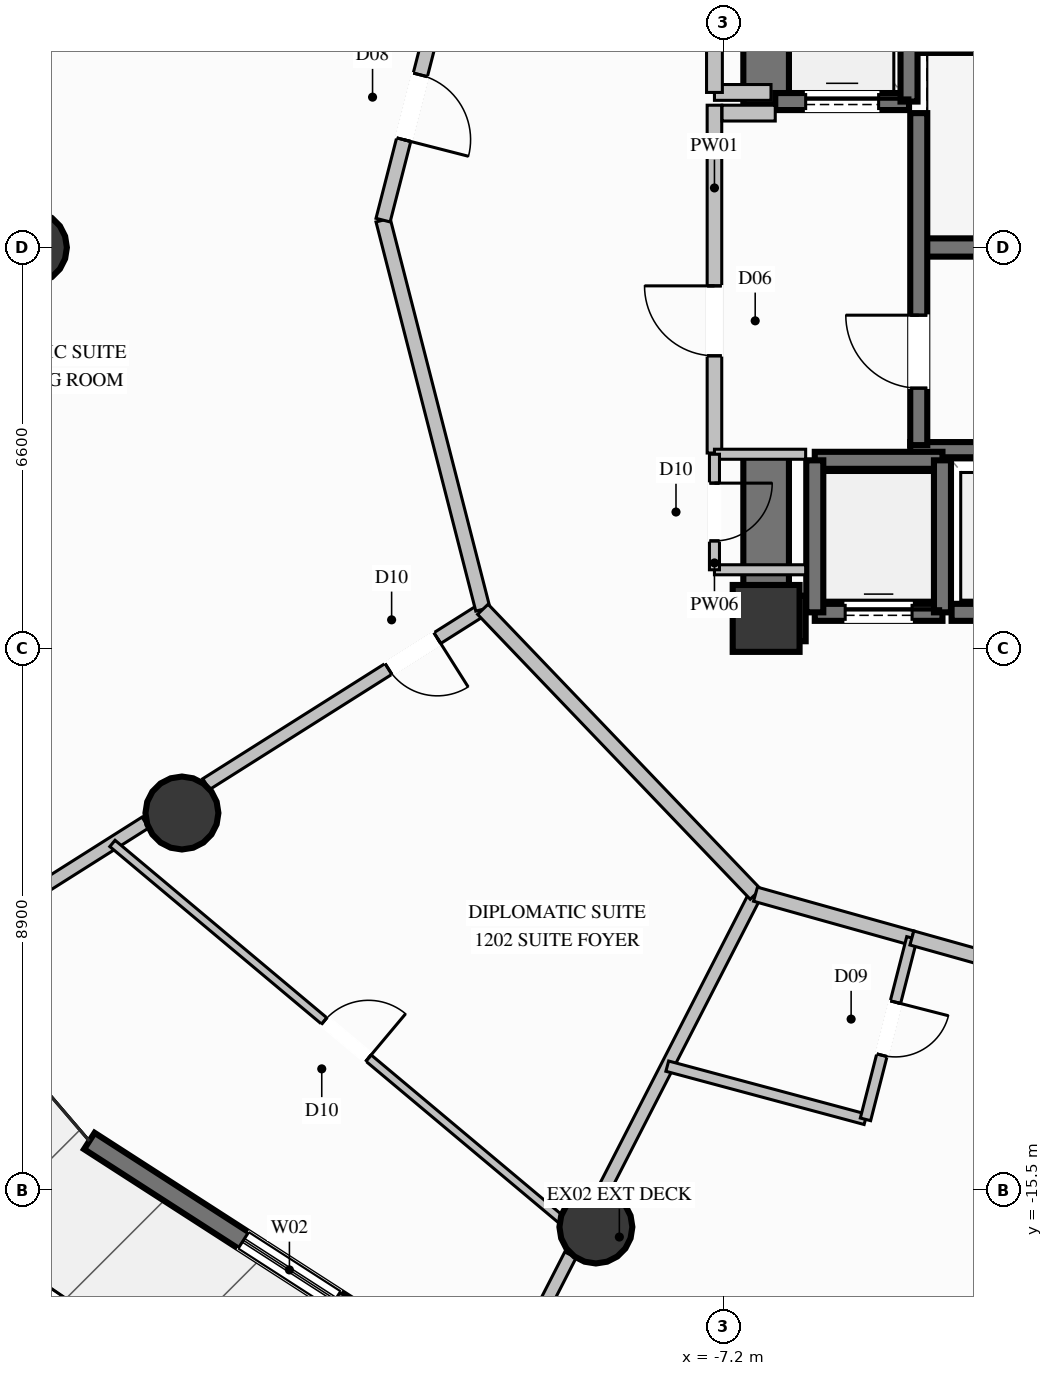
"""IFC4 building model, lengths in metres.
Left out: names, types, materials, properties, quantities, classifications, styles, units other than length and angle.
Written with IfcOpenShell. Run it as: python <this file> out.ifc"""

import sys

from ifc_helpers import new_model, si_unit, direction, frame, frame_2d, origin, origin_2d, place, context, subcontext, project, spatial, rectangle, circle, extrude, element, fill, save


model = new_model("IFC4")
c1 = context("Model", 3, precision=1e-05, world=origin(), true_north=direction((0.0, 1.0)))
c2 = subcontext(c1, "Body", "Model", "MODEL_VIEW")
j1 = project(units=[si_unit("LENGTHUNIT", "METRE"), si_unit("PLANEANGLEUNIT", "RADIAN")], contexts=[c1])
p1 = place(None, origin())
s1 = spatial("IfcSite", under=j1, at=p1, CompositionType="ELEMENT")
p2 = place(p1, origin())
s2 = spatial("IfcBuilding", under=s1, at=p2, CompositionType="ELEMENT")
p3 = place(p2, frame((0.0, 0.0, 46.4)))
s3 = spatial("IfcBuildingStorey", under=s2, at=p3, CompositionType="ELEMENT", Elevation=46.4)
p4 = place(p3, frame((-6.5, -6.1, 0.0), z_axis=(0.0, 0.0, 1.0), x_axis=(1.0, 0.0, 0.0)))
e1 = element("IfcColumn", 1, at=p4, inside=s3, PredefinedType="COLUMN", context=c2, shape_type="SweptSolid", body=[
    extrude(rectangle(XDim=1.1, YDim=1.1, at=origin_2d()), origin(), (0.0, 0.0, 1.0), 3.6),
])
p5 = place(p3, frame((-3.99, 0.0, 0.0), z_axis=(0.0, 0.0, 1.0), x_axis=(1.0, 0.0, 0.0)))
e2 = element("IfcWall", 2, at=p5, inside=s3, PredefinedType="SHEAR", context=c2, shape_type="SweptSolid", body=[
    extrude(rectangle(XDim=7.98, YDim=0.3, at=frame_2d((3.99, 0.0))), origin(), (0.0, 0.0, 1.0), 3.6),
])
for number, where, z_axis, x_axis in (
    (3, (-4.13, -3.325, 0.0), (0.0, 0.0, 1.0), (1.0, 0.0, 0.0)),
    (4, (-4.13, 3.325, 0.0), (0.0, 0.0, 1.0), (1.0, 0.0, 0.0)),
):
    element("IfcWall", number, at=place(p3, frame(where, z_axis=z_axis, x_axis=x_axis)), inside=s3, PredefinedType="SOLIDWALL", context=c2, shape_type="SweptSolid", body=[
        extrude(rectangle(XDim=8.26, YDim=0.25, at=frame_2d((4.13, 0.0))), origin(), (0.0, 0.0, 1.0), 3.6),
    ])
p6 = place(p3, frame((-6.125, -6.1, 0.0), z_axis=(0.0, 0.0, 1.0), x_axis=(1.0, 0.0, 0.0)))
e5 = element("IfcWall", 5, at=p6, inside=s3, PredefinedType="SHEAR", context=c2, shape_type="SweptSolid", body=[
    extrude(rectangle(XDim=0.275, YDim=0.75, at=frame_2d((0.137, 0.0))), origin(), (0.0, 0.0, 1.0), 3.6),
])
p7 = place(p3, frame((-6.5, 2.35, 0.0), z_axis=(0.0, 0.0, 1.0), x_axis=(0.0, 1.0, 0.0)))
e6 = element("IfcWall", 6, at=p7, inside=s3, PredefinedType="SHEAR", context=c2, shape_type="SweptSolid", body=[
    extrude(rectangle(XDim=4.125, YDim=0.75, at=frame_2d((2.062, 0.0))), origin(), (0.0, 0.0, 1.0), 3.6),
])
p8 = place(p3, frame((-6.5, -6.475, 0.0), z_axis=(0.0, 0.0, 1.0), x_axis=(0.0, 1.0, 0.0)))
e7 = element("IfcWall", 7, at=p8, inside=s3, PredefinedType="SHEAR", context=c2, shape_type="SweptSolid", body=[
    extrude(rectangle(XDim=3.125, YDim=0.75, at=frame_2d((1.562, 0.0))), origin(), (0.0, 0.0, 1.0), 3.6),
])
for number, where, z_axis, x_axis in (
    (8, (-18.6, 0.0, 0.0), (0.0, 0.0, 1.0), (1.0, 0.0, 0.0)),
    (9, (-16.108, -9.3, 0.0), (0.0, 0.0, 1.0), (1.0, 0.0, 0.0)),
    (10, (-9.3, -16.108, 0.0), (0.0, 0.0, 1.0), (1.0, 0.0, 0.0)),
):
    element("IfcColumn", number, at=place(p3, frame(where, z_axis=z_axis, x_axis=x_axis)), inside=s3, PredefinedType="COLUMN", context=c2, shape_type="SweptSolid", body=[
        extrude(circle(Radius=0.6, at=origin_2d()), origin(), (0.0, 0.0, 1.0), 3.6),
    ])
p9 = place(p3, frame((-10.78, -19.107, 0.0), z_axis=(0.0, 0.0, 1.0), x_axis=(-0.840699239941, 0.541502343451, 0.0)))
e11 = element("IfcWall", 11, at=p9, inside=s3, PredefinedType="SOLIDWALL", context=c2, shape_type="SweptSolid", body=[
    extrude(rectangle(XDim=8.149, YDim=0.32, at=frame_2d((4.075, 0.0))), origin(), (0.0, 0.0, 1.0), 3.34),
])
p10 = place(p9, frame((3.335, 0.0, 0.35)))
e12 = element("IfcOpeningElement", 12, at=p10, cuts=e11, PredefinedType="OPENING", context=c2, shape_type="SweptSolid", body=[
    extrude(rectangle(XDim=1.8, YDim=2.6, at=frame_2d((0.9, 1.3))), frame((0.0, 0.17, 0.0), z_axis=(0.0, -1.0, 0.0), x_axis=(1.0, 0.0, 0.0)), (0.0, 0.0, 1.0), 0.34),
])
p11 = place(p3, frame((-5.7, -6.0, 0.0), z_axis=(0.0, 0.0, 1.0), x_axis=(1.0, 0.0, 0.0)))
e13 = element("IfcWall", 13, at=p11, inside=s3, PredefinedType="SOLIDWALL", context=c2, shape_type="SweptSolid", body=[
    extrude(rectangle(XDim=2.1, YDim=0.28, at=frame_2d((1.05, 0.0))), origin(), (0.0, 0.0, 1.0), 3.34),
])
p12 = place(p11, frame((0.5, 0.0, 0.0)))
e14 = element("IfcOpeningElement", 14, at=p12, cuts=e13, PredefinedType="OPENING", context=c2, shape_type="SweptSolid", body=[
    extrude(rectangle(XDim=1.1, YDim=2.2, at=frame_2d((0.55, 1.1))), frame((0.0, 0.15, 0.0), z_axis=(0.0, -1.0, 0.0), x_axis=(1.0, 0.0, 0.0)), (0.0, 0.0, 1.0), 0.3),
])
p13 = place(p3, frame((-3.6, -3.5, 0.0), z_axis=(0.0, 0.0, 1.0), x_axis=(-1.0, 0.0, 0.0)))
e15 = element("IfcWall", 15, at=p13, inside=s3, PredefinedType="SOLIDWALL", context=c2, shape_type="SweptSolid", body=[
    extrude(rectangle(XDim=2.1, YDim=0.28, at=frame_2d((1.05, 0.0))), origin(), (0.0, 0.0, 1.0), 3.34),
])
for number, where, z_axis, x_axis in (
    (16, (-5.7, -3.5, 0.0), (0.0, 0.0, 1.0), (0.0, -1.0, 0.0)),
    (17, (-3.6, -6.0, 0.0), (0.0, 0.0, 1.0), (0.0, 1.0, 0.0)),
):
    element("IfcWall", number, at=place(p3, frame(where, z_axis=z_axis, x_axis=x_axis)), inside=s3, PredefinedType="SOLIDWALL", context=c2, shape_type="SweptSolid", body=[
        extrude(rectangle(XDim=2.5, YDim=0.28, at=frame_2d((1.25, 0.0))), origin(), (0.0, 0.0, 1.0), 3.34),
    ])
p14 = place(p3, frame((-3.45, -6.0, 0.0), z_axis=(0.0, 0.0, 1.0), x_axis=(1.0, 0.0, 0.0)))
e18 = element("IfcWall", 18, at=p14, inside=s3, PredefinedType="SOLIDWALL", context=c2, shape_type="SweptSolid", body=[
    extrude(rectangle(XDim=2.1, YDim=0.28, at=frame_2d((1.05, 0.0))), origin(), (0.0, 0.0, 1.0), 3.34),
])
p15 = place(p14, frame((0.5, 0.0, 0.0)))
e19 = element("IfcOpeningElement", 19, at=p15, cuts=e18, PredefinedType="OPENING", context=c2, shape_type="SweptSolid", body=[
    extrude(rectangle(XDim=1.1, YDim=2.2, at=frame_2d((0.55, 1.1))), frame((0.0, 0.15, 0.0), z_axis=(0.0, -1.0, 0.0), x_axis=(1.0, 0.0, 0.0)), (0.0, 0.0, 1.0), 0.3),
])
p16 = place(p3, frame((-6.35, 2.4, 0.0), z_axis=(0.0, 0.0, 1.0), x_axis=(1.0, 0.0, 0.0)))
e20 = element("IfcWall", 20, at=p16, inside=s3, PredefinedType="SOLIDWALL", context=c2, shape_type="SweptSolid", body=[
    extrude(rectangle(XDim=2.2, YDim=0.28, at=frame_2d((1.1, 0.0))), origin(), (0.0, 0.0, 1.0), 3.34),
])
p17 = place(p16, frame((0.5, 0.0, 0.0)))
e21 = element("IfcOpeningElement", 21, at=p17, cuts=e20, PredefinedType="OPENING", context=c2, shape_type="SweptSolid", body=[
    extrude(rectangle(XDim=1.2, YDim=2.2, at=frame_2d((0.6, 1.1))), frame((0.0, 0.15, 0.0), z_axis=(0.0, -1.0, 0.0), x_axis=(1.0, 0.0, 0.0)), (0.0, 0.0, 1.0), 0.3),
])
p18 = place(p3, frame((-4.15, 2.4, 0.0), z_axis=(0.0, 0.0, 1.0), x_axis=(0.0, 1.0, 0.0)))
e22 = element("IfcWall", 22, at=p18, inside=s3, PredefinedType="SOLIDWALL", context=c2, shape_type="SweptSolid", body=[
    extrude(rectangle(XDim=2.7, YDim=0.28, at=frame_2d((1.35, 0.0))), origin(), (0.0, 0.0, 1.0), 3.34),
])
p19 = place(p3, frame((-3.99, -3.25, 0.0), z_axis=(0.0, 0.0, 1.0), x_axis=(0.0, 1.0, 0.0)))
e23 = element("IfcWall", 23, at=p19, inside=s3, PredefinedType="SOLIDWALL", context=c2, shape_type="SweptSolid", body=[
    extrude(rectangle(XDim=5.46, YDim=0.28, at=frame_2d((2.73, 0.0))), origin(), (0.0, 0.0, 1.0), 3.34),
])
p20 = place(p19, frame((0.937, 0.0, 0.0)))
e24 = element("IfcOpeningElement", 24, at=p20, cuts=e23, PredefinedType="OPENING", context=c2, shape_type="SweptSolid", body=[
    extrude(rectangle(XDim=1.2, YDim=2.2, at=frame_2d((0.6, 1.1))), frame((0.0, 0.15, 0.0), z_axis=(0.0, -1.0, 0.0), x_axis=(1.0, 0.0, 0.0)), (0.0, 0.0, 1.0), 0.3),
])
p21 = place(p3, frame((-7.35, -3.38, 0.0), z_axis=(0.0, 0.0, 1.0), x_axis=(0.0, 1.0, 0.0)))
e25 = element("IfcWall", 25, at=p21, inside=s3, PredefinedType="PARTITIONING", context=c2, shape_type="SweptSolid", body=[
    extrude(rectangle(XDim=5.72, YDim=0.24, at=frame_2d((2.86, 0.0))), origin(), (0.0, 0.0, 1.0), 2.425),
])
p22 = place(p21, frame((1.599, 0.0, 0.0)))
e26 = element("IfcOpeningElement", 26, at=p22, cuts=e25, PredefinedType="OPENING", context=c2, shape_type="SweptSolid", body=[
    extrude(rectangle(XDim=1.15, YDim=2.2, at=frame_2d((0.575, 1.1))), frame((0.0, 0.13, 0.0), z_axis=(0.0, -1.0, 0.0), x_axis=(1.0, 0.0, 0.0)), (0.0, 0.0, 1.0), 0.26),
])
p23 = place(p3, frame((-7.225, 2.21, 0.0), z_axis=(0.0, 0.0, 1.0), x_axis=(1.0, 0.0, 0.0)))
e27 = element("IfcWall", 27, at=p23, inside=s3, PredefinedType="PARTITIONING", context=c2, shape_type="SweptSolid", body=[
    extrude(rectangle(XDim=0.875, YDim=0.26, at=frame_2d((0.438, 0.0))), origin(), (0.0, 0.0, 1.0), 3.34),
])
p24 = place(p3, frame((-7.35, 2.55, 0.0), z_axis=(0.0, 0.0, 1.0), x_axis=(1.0, 0.0, 0.0)))
e28 = element("IfcWall", 28, at=p24, inside=s3, PredefinedType="PARTITIONING", context=c2, shape_type="SweptSolid", body=[
    extrude(rectangle(XDim=0.93, YDim=0.26, at=frame_2d((0.465, 0.0))), origin(), (0.0, 0.0, 1.0), 3.34),
])
p25 = place(p3, frame((-7.35, 2.55, 0.0), z_axis=(0.0, 0.0, 1.0), x_axis=(0.0, 1.0, 0.0)))
e29 = element("IfcWall", 29, at=p25, inside=s3, PredefinedType="PARTITIONING", context=c2, shape_type="SweptSolid", body=[
    extrude(rectangle(XDim=2.4, YDim=0.26, at=frame_2d((1.2, 0.0))), origin(), (0.0, 0.0, 1.0), 2.425),
])
p26 = place(p25, frame((0.775, 0.0, 0.0)))
e30 = element("IfcOpeningElement", 30, at=p26, cuts=e29, PredefinedType="OPENING", context=c2, shape_type="SweptSolid", body=[
    extrude(rectangle(XDim=0.85, YDim=2.05, at=frame_2d((0.425, 1.025))), frame((0.0, 0.14, 0.0), z_axis=(0.0, -1.0, 0.0), x_axis=(1.0, 0.0, 0.0)), (0.0, 0.0, 1.0), 0.28),
])
p27 = place(p3, frame((-7.35, -5.3, 0.0), z_axis=(0.0, 0.0, 1.0), x_axis=(1.0, 0.0, 0.0)))
e31 = element("IfcWall", 31, at=p27, inside=s3, PredefinedType="PARTITIONING", context=c2, shape_type="SweptSolid", body=[
    extrude(rectangle(XDim=1.5, YDim=0.165, at=frame_2d((0.75, 0.0))), origin(), (0.0, 0.0, 1.0), 2.425),
])
p28 = place(p3, frame((-5.85, -3.4, 0.0), z_axis=(0.0, 0.0, 1.0), x_axis=(-1.0, 0.0, 0.0)))
e32 = element("IfcWall", 32, at=p28, inside=s3, PredefinedType="PARTITIONING", context=c2, shape_type="SweptSolid", body=[
    extrude(rectangle(XDim=1.5, YDim=0.165, at=frame_2d((0.75, 0.0))), origin(), (0.0, 0.0, 1.0), 3.34),
])
p29 = place(p3, frame((-7.35, -3.4, 0.0), z_axis=(0.0, 0.0, 1.0), x_axis=(0.0, -1.0, 0.0)))
e33 = element("IfcWall", 33, at=p29, inside=s3, PredefinedType="PARTITIONING", context=c2, shape_type="SweptSolid", body=[
    extrude(rectangle(XDim=1.9, YDim=0.165, at=frame_2d((0.95, 0.0))), origin(), (0.0, 0.0, 1.0), 3.34),
])
p30 = place(p29, frame((0.475, 0.0, 0.0)))
e34 = element("IfcOpeningElement", 34, at=p30, cuts=e33, PredefinedType="OPENING", context=c2, shape_type="SweptSolid", body=[
    extrude(rectangle(XDim=0.95, YDim=2.1, at=frame_2d((0.475, 1.05))), frame((0.0, 0.093, 0.0), z_axis=(0.0, -1.0, 0.0), x_axis=(1.0, 0.0, 0.0)), (0.0, 0.0, 1.0), 0.185),
])
p31 = place(p3, frame((-11.159, -5.95, 0.0), z_axis=(0.0, 0.0, 1.0), x_axis=(-0.845381098804, -0.534163643264, 0.0)))
e35 = element("IfcWall", 35, at=p31, inside=s3, PredefinedType="PARTITIONING", context=c2, shape_type="SweptSolid", body=[
    extrude(rectangle(XDim=5.382, YDim=0.21, at=frame_2d((2.691, 0.0))), origin(), (0.0, 0.0, 1.0), 2.709),
])
p32 = place(p31, frame((0.886, 0.0, 0.0)))
e36 = element("IfcOpeningElement", 36, at=p32, cuts=e35, PredefinedType="OPENING", context=c2, shape_type="SweptSolid", body=[
    extrude(rectangle(XDim=0.95, YDim=2.1, at=frame_2d((0.475, 1.05))), frame((0.0, 0.115, 0.0), z_axis=(0.0, -1.0, 0.0), x_axis=(1.0, 0.0, 0.0)), (0.0, 0.0, 1.0), 0.23),
])
p33 = place(p3, frame((-16.708, -9.456, 0.0), z_axis=(0.0, 0.0, 1.0), x_axis=(-0.845312509881, -0.534272178425, 0.0)))
e37 = element("IfcWall", 37, at=p33, inside=s3, PredefinedType="PARTITIONING", context=c2, shape_type="SweptSolid", body=[
    extrude(rectangle(XDim=4.112, YDim=0.21, at=frame_2d((2.056, 0.0))), origin(), (0.0, 0.0, 1.0), 3.34),
])
p34 = place(p3, frame((-6.675, -10.635, 0.0), z_axis=(0.0, 0.0, 1.0), x_axis=(-0.456563129712, -0.889691018605, 0.0)))
e38 = element("IfcWall", 38, at=p34, inside=s3, PredefinedType="PARTITIONING", context=c2, shape_type="SweptSolid", body=[
    extrude(rectangle(XDim=5.469, YDim=0.21, at=frame_2d((2.735, 0.0))), origin(), (0.0, 0.0, 1.0), 2.709),
])
p35 = place(p3, frame((-9.718, -16.566, 0.0), z_axis=(0.0, 0.0, 1.0), x_axis=(-0.456431135396, -0.889758741818, 0.0)))
e39 = element("IfcWall", 39, at=p35, inside=s3, PredefinedType="PARTITIONING", context=c2, shape_type="SweptSolid", body=[
    extrude(rectangle(XDim=2.684, YDim=0.21, at=frame_2d((1.342, 0.0))), origin(), (0.0, 0.0, 1.0), 3.34),
])
p36 = place(p3, frame((-12.8, 0.45, 0.0), z_axis=(0.0, 0.0, 1.0), x_axis=(0.24839135289, -0.968659762667, 0.0)))
e40 = element("IfcWall", 40, at=p36, inside=s3, PredefinedType="PARTITIONING", context=c2, shape_type="SweptSolid", body=[
    extrude(rectangle(XDim=6.607, YDim=0.24, at=frame_2d((3.303, 0.0))), origin(), (0.0, 0.0, 1.0), 3.34),
])
p37 = place(p3, frame((-11.848, 4.162, 0.0), z_axis=(0.0, 0.0, 1.0), x_axis=(-0.248451984896, -0.968644212909, 0.0)))
e41 = element("IfcWall", 41, at=p37, inside=s3, PredefinedType="PARTITIONING", context=c2, shape_type="SweptSolid", body=[
    extrude(rectangle(XDim=3.832, YDim=0.24, at=frame_2d((1.916, 0.0))), origin(), (0.0, 0.0, 1.0), 3.34),
])
p38 = place(p37, frame((1.366, 0.0, 0.0)))
e42 = element("IfcOpeningElement", 42, at=p38, cuts=e41, PredefinedType="OPENING", context=c2, shape_type="SweptSolid", body=[
    extrude(rectangle(XDim=1.1, YDim=2.3, at=frame_2d((0.55, 1.15))), frame((0.0, 0.13, 0.0), z_axis=(0.0, -1.0, 0.0), x_axis=(1.0, 0.0, 0.0)), (0.0, 0.0, 1.0), 0.26),
])
p39 = place(p3, frame((-11.159, -5.95, 0.0), z_axis=(0.0, 0.0, 1.0), x_axis=(0.691426053968, -0.722447238138, 0.0)))
e43 = element("IfcWall", 43, at=p39, inside=s3, PredefinedType="PARTITIONING", context=c2, shape_type="SweptSolid", body=[
    extrude(rectangle(XDim=6.485, YDim=0.24, at=frame_2d((3.242, 0.0))), origin(), (0.0, 0.0, 1.0), 3.34),
])
p40 = place(p3, frame((-17.251, -9.8, 0.0), z_axis=(0.0, 0.0, 1.0), x_axis=(0.766386533377, -0.642379701935, 0.0)))
e44 = element("IfcWall", 44, at=p40, inside=s3, PredefinedType="PARTITIONING", context=c2, shape_type="SweptSolid", body=[
    extrude(rectangle(XDim=10.041, YDim=0.135, at=frame_2d((5.021, 0.0))), origin(), (0.0, 0.0, 1.0), 2.792),
])
p41 = place(p40, frame((4.545, 0.0, 0.0)))
e45 = element("IfcOpeningElement", 45, at=p41, cuts=e44, PredefinedType="OPENING", context=c2, shape_type="SweptSolid", body=[
    extrude(rectangle(XDim=0.95, YDim=2.1, at=frame_2d((0.475, 1.05))), frame((0.0, 0.078, 0.0), z_axis=(0.0, -1.0, 0.0), x_axis=(1.0, 0.0, 0.0)), (0.0, 0.0, 1.0), 0.155),
])
p42 = place(p3, frame((-6.675, -10.635, 0.0), z_axis=(0.0, 0.0, 1.0), x_axis=(0.962983004146, -0.269562114782, 0.0)))
e46 = element("IfcWall", 46, at=p42, inside=s3, PredefinedType="PARTITIONING", context=c2, shape_type="SweptSolid", body=[
    extrude(rectangle(XDim=2.671, YDim=0.24, at=frame_2d((1.335, 0.0))), origin(), (0.0, 0.0, 1.0), 3.34),
])
p43 = place(p3, frame((-8.126, -13.463, 0.0), z_axis=(0.0, 0.0, 1.0), x_axis=(0.965815899111, -0.259228950978, 0.0)))
e47 = element("IfcWall", 47, at=p43, inside=s3, PredefinedType="PLUMBINGWALL", context=c2, shape_type="SweptSolid", body=[
    extrude(rectangle(XDim=3.375, YDim=0.175, at=frame_2d((1.688, 0.0))), origin(), (0.0, 0.0, 1.0), 3.34),
])
p44 = place(p3, frame((-4.103, -11.355, 0.0), z_axis=(0.0, 0.0, 1.0), x_axis=(-0.24779344182, -0.96881288709, 0.0)))
e48 = element("IfcWall", 48, at=p44, inside=s3, PredefinedType="PLUMBINGWALL", context=c2, shape_type="SweptSolid", body=[
    extrude(rectangle(XDim=3.079, YDim=0.175, at=frame_2d((1.54, 0.0))), origin(), (0.0, 0.0, 1.0), 3.34),
])
p45 = place(p44, frame((1.09, 0.0, 0.0)))
e49 = element("IfcOpeningElement", 49, at=p45, cuts=e48, PredefinedType="OPENING", context=c2, shape_type="SweptSolid", body=[
    extrude(rectangle(XDim=0.9, YDim=2.1, at=frame_2d((0.45, 1.05))), frame((0.0, 0.098, 0.0), z_axis=(0.0, -1.0, 0.0), x_axis=(1.0, 0.0, 0.0)), (0.0, 0.0, 1.0), 0.195),
])
p46 = place(p3, frame((-4.103, -11.355, 0.0), z_axis=(0.0, 0.0, 1.0), x_axis=(0.962944088122, -0.269701099648, 0.0)))
e50 = element("IfcWall", 50, at=p46, inside=s3, PredefinedType="PARTITIONING", context=c2, shape_type="SweptSolid", body=[
    extrude(rectangle(XDim=3.69, YDim=0.24, at=frame_2d((1.845, 0.0))), origin(), (0.0, 0.0, 1.0), 3.34),
])
p47 = place(p46, frame((1.295, 0.0, 0.0)))
e51 = element("IfcOpeningElement", 51, at=p47, cuts=e50, PredefinedType="OPENING", context=c2, shape_type="SweptSolid", body=[
    extrude(rectangle(XDim=1.1, YDim=2.3, at=frame_2d((0.55, 1.15))), frame((0.0, 0.13, 0.0), z_axis=(0.0, -1.0, 0.0), x_axis=(1.0, 0.0, 0.0)), (0.0, 0.0, 1.0), 0.26),
])
p48 = place(p10, origin())
e52 = element("IfcWindow", 52, at=p48, inside=s3, PartitioningType="SINGLE_PANEL", PredefinedType="WINDOW", context=c2, shape_type="SweptSolid", body=[
    extrude(rectangle(XDim=1.8, YDim=2.6, at=frame_2d((0.9, 1.3))), frame((0.0, 0.03, 0.0), z_axis=(0.0, -1.0, 0.0), x_axis=(1.0, 0.0, 0.0)), (0.0, 0.0, 1.0), 0.06),
])
fill(e12, e52)
p49 = place(p12, origin())
e53 = element("IfcDoor", 53, at=p49, inside=s3, OperationType="SLIDING_TO_LEFT", PredefinedType="DOOR", context=c2, shape_type="SweptSolid", body=[
    extrude(rectangle(XDim=1.1, YDim=2.2, at=frame_2d((0.55, 1.1))), frame((0.0, 0.025, 0.0), z_axis=(0.0, -1.0, 0.0), x_axis=(1.0, 0.0, 0.0)), (0.0, 0.0, 1.0), 0.05),
])
fill(e14, e53)
p50 = place(p17, origin())
e54 = element("IfcDoor", 54, at=p50, inside=s3, OperationType="SLIDING_TO_LEFT", PredefinedType="DOOR", context=c2, shape_type="SweptSolid", body=[
    extrude(rectangle(XDim=1.2, YDim=2.2, at=frame_2d((0.6, 1.1))), frame((0.0, 0.025, 0.0), z_axis=(0.0, -1.0, 0.0), x_axis=(1.0, 0.0, 0.0)), (0.0, 0.0, 1.0), 0.05),
])
fill(e21, e54)
p51 = place(p20, origin())
e55 = element("IfcDoor", 55, at=p51, inside=s3, OperationType="SINGLE_SWING_RIGHT", PredefinedType="DOOR", context=c2, shape_type="SweptSolid", body=[
    extrude(rectangle(XDim=1.2, YDim=2.2, at=frame_2d((0.6, 1.1))), frame((0.0, 0.025, 0.0), z_axis=(0.0, -1.0, 0.0), x_axis=(1.0, 0.0, 0.0)), (0.0, 0.0, 1.0), 0.05),
])
fill(e24, e55)
p52 = place(p22, origin())
e56 = element("IfcDoor", 56, at=p52, inside=s3, OperationType="SINGLE_SWING_RIGHT", PredefinedType="DOOR", context=c2, shape_type="SweptSolid", body=[
    extrude(rectangle(XDim=1.15, YDim=2.2, at=frame_2d((0.575, 1.1))), frame((0.0, 0.025, 0.0), z_axis=(0.0, -1.0, 0.0), x_axis=(1.0, 0.0, 0.0)), (0.0, 0.0, 1.0), 0.05),
])
fill(e26, e56)
p53 = place(p30, origin())
e57 = element("IfcDoor", 57, at=p53, inside=s3, OperationType="SINGLE_SWING_LEFT", PredefinedType="DOOR", context=c2, shape_type="SweptSolid", body=[
    extrude(rectangle(XDim=0.95, YDim=2.1, at=frame_2d((0.475, 1.05))), frame((0.0, 0.025, 0.0), z_axis=(0.0, -1.0, 0.0), x_axis=(1.0, 0.0, 0.0)), (0.0, 0.0, 1.0), 0.05),
])
fill(e34, e57)
p54 = place(p38, origin())
e58 = element("IfcDoor", 58, at=p54, inside=s3, OperationType="SINGLE_SWING_RIGHT", PredefinedType="DOOR", context=c2, shape_type="SweptSolid", body=[
    extrude(rectangle(XDim=1.1, YDim=2.3, at=frame_2d((0.55, 1.15))), frame((0.0, 0.025, 0.0), z_axis=(0.0, -1.0, 0.0), x_axis=(1.0, 0.0, 0.0)), (0.0, 0.0, 1.0), 0.05),
])
fill(e42, e58)
p55 = place(p32, origin())
e59 = element("IfcDoor", 59, at=p55, inside=s3, OperationType="SINGLE_SWING_LEFT", PredefinedType="DOOR", context=c2, shape_type="SweptSolid", body=[
    extrude(rectangle(XDim=0.95, YDim=2.1, at=frame_2d((0.475, 1.05))), frame((0.0, 0.025, 0.0), z_axis=(0.0, -1.0, 0.0), x_axis=(1.0, 0.0, 0.0)), (0.0, 0.0, 1.0), 0.05),
])
fill(e36, e59)
p56 = place(p41, origin())
e60 = element("IfcDoor", 60, at=p56, inside=s3, OperationType="SINGLE_SWING_RIGHT", PredefinedType="DOOR", context=c2, shape_type="SweptSolid", body=[
    extrude(rectangle(XDim=0.95, YDim=2.1, at=frame_2d((0.475, 1.05))), frame((0.0, 0.025, 0.0), z_axis=(0.0, -1.0, 0.0), x_axis=(1.0, 0.0, 0.0)), (0.0, 0.0, 1.0), 0.05),
])
fill(e45, e60)
p57 = place(p45, origin())
e61 = element("IfcDoor", 61, at=p57, inside=s3, OperationType="SINGLE_SWING_LEFT", PredefinedType="DOOR", context=c2, shape_type="SweptSolid", body=[
    extrude(rectangle(XDim=0.9, YDim=2.1, at=frame_2d((0.45, 1.05))), frame((0.0, 0.025, 0.0), z_axis=(0.0, -1.0, 0.0), x_axis=(1.0, 0.0, 0.0)), (0.0, 0.0, 1.0), 0.05),
])
fill(e49, e61)
save(model, sys.argv[1])
